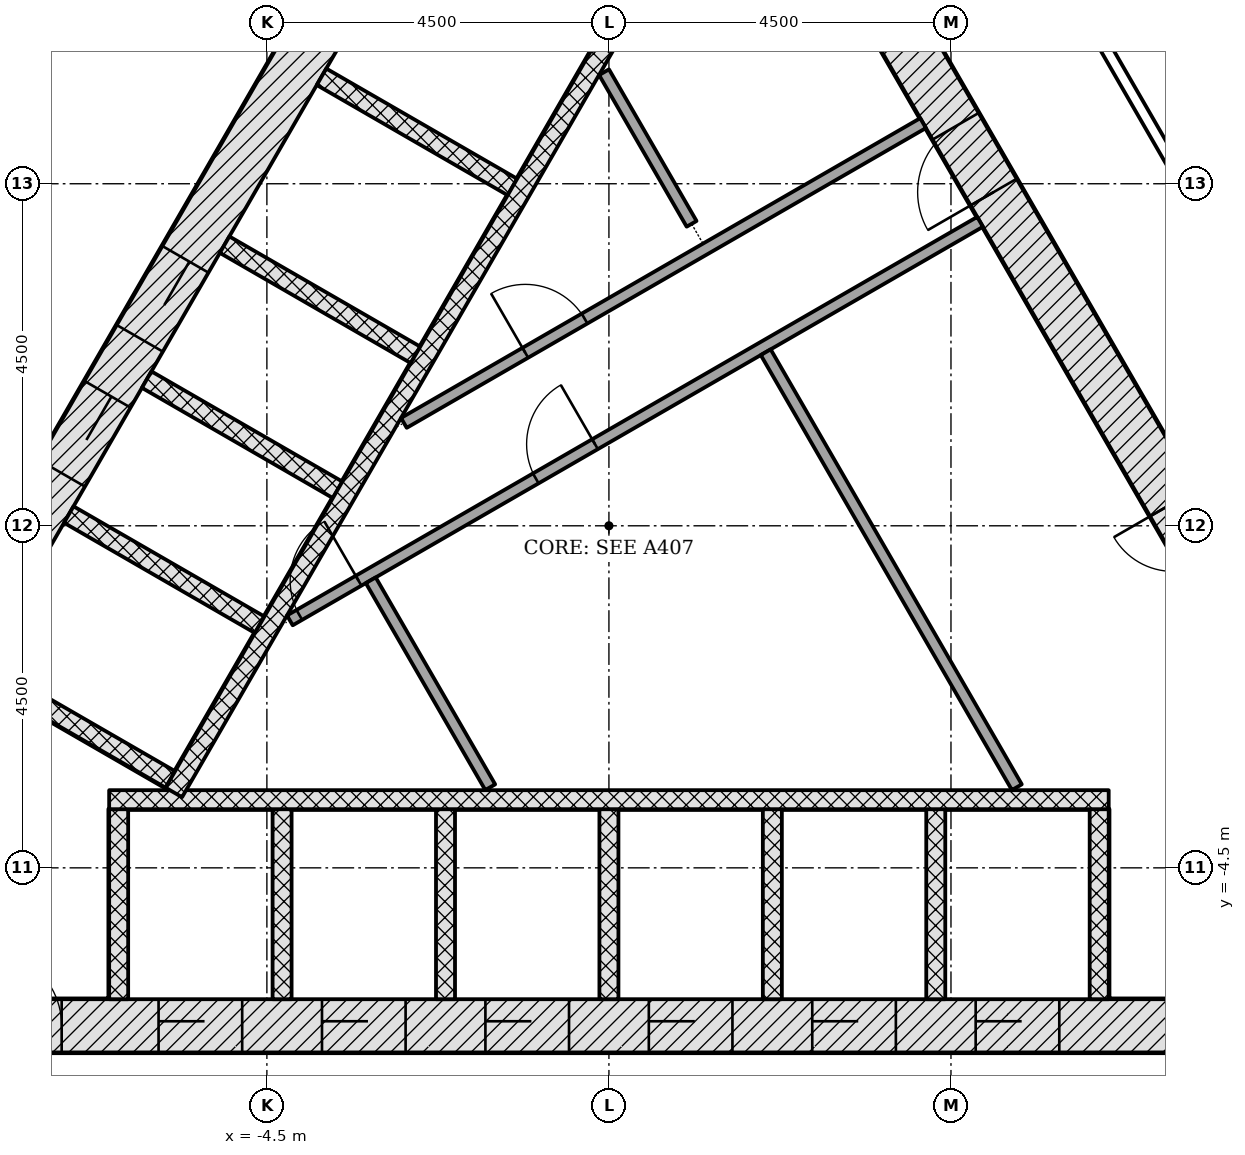
"""IFC4 building model, lengths in metres.
Left out: names, types, materials, properties, quantities, classifications, styles, units other than length and angle.
Written with IfcOpenShell. Run it as: python <this file> out.ifc"""

import sys

from ifc_helpers import new_model, si_unit, direction, frame, frame_2d, origin, place, context, subcontext, project, spatial, rectangle, extrude, element, fill, save


model = new_model("IFC4")
c1 = context("Model", 3, precision=1e-05, world=origin(), true_north=direction((0.0, 1.0)))
c2 = subcontext(c1, "Body", "Model", "MODEL_VIEW")
j1 = project(units=[si_unit("LENGTHUNIT", "METRE"), si_unit("PLANEANGLEUNIT", "RADIAN")], contexts=[c1])
p1 = place(None, origin())
s1 = spatial("IfcSite", under=j1, at=p1, CompositionType="ELEMENT")
p2 = place(p1, origin())
s2 = spatial("IfcBuilding", under=s1, at=p2, CompositionType="ELEMENT")
p3 = place(p2, frame((0.0, 0.0, 105.9)))
s3 = spatial("IfcBuildingStorey", under=s2, at=p3, CompositionType="ELEMENT", Elevation=105.9)
p4 = place(p3, frame((-9.229, -6.578, -0.2), z_axis=(0.0, 0.0, 1.0), x_axis=(1.0, 0.0, 0.0)))
e1 = element("IfcWall", 1, at=p4, inside=s3, PredefinedType="SHEAR", context=c2, shape_type="SweptSolid", body=[
    extrude(rectangle(XDim=18.458, YDim=0.7, at=frame_2d((9.229, 0.0))), origin(), (0.0, 0.0, 1.0), 3.6),
])
p5 = place(p4, frame((3.304, 0.0, 0.2)))
e2 = element("IfcOpeningElement", 2, at=p5, cuts=e1, PredefinedType="OPENING", context=c2, shape_type="SweptSolid", body=[
    extrude(rectangle(XDim=1.1, YDim=2.1, at=frame_2d((0.55, 1.05))), frame((0.0, 0.36, 0.0), z_axis=(0.0, -1.0, 0.0), x_axis=(1.0, 0.0, 0.0)), (0.0, 0.0, 1.0), 0.72),
])
p6 = place(p4, frame((5.454, 0.0, 0.2)))
e3 = element("IfcOpeningElement", 3, at=p6, cuts=e1, PredefinedType="OPENING", context=c2, shape_type="SweptSolid", body=[
    extrude(rectangle(XDim=1.1, YDim=2.1, at=frame_2d((0.55, 1.05))), frame((0.0, 0.36, 0.0), z_axis=(0.0, -1.0, 0.0), x_axis=(1.0, 0.0, 0.0)), (0.0, 0.0, 1.0), 0.72),
])
p7 = place(p4, frame((7.604, 0.0, 0.2)))
e4 = element("IfcOpeningElement", 4, at=p7, cuts=e1, PredefinedType="OPENING", context=c2, shape_type="SweptSolid", body=[
    extrude(rectangle(XDim=1.1, YDim=2.1, at=frame_2d((0.55, 1.05))), frame((0.0, 0.36, 0.0), z_axis=(0.0, -1.0, 0.0), x_axis=(1.0, 0.0, 0.0)), (0.0, 0.0, 1.0), 0.72),
])
p8 = place(p4, frame((9.754, 0.0, 0.2)))
e5 = element("IfcOpeningElement", 5, at=p8, cuts=e1, PredefinedType="OPENING", context=c2, shape_type="SweptSolid", body=[
    extrude(rectangle(XDim=1.1, YDim=2.1, at=frame_2d((0.55, 1.05))), frame((0.0, 0.36, 0.0), z_axis=(0.0, -1.0, 0.0), x_axis=(1.0, 0.0, 0.0)), (0.0, 0.0, 1.0), 0.72),
])
p9 = place(p4, frame((11.904, 0.0, 0.2)))
e6 = element("IfcOpeningElement", 6, at=p9, cuts=e1, PredefinedType="OPENING", context=c2, shape_type="SweptSolid", body=[
    extrude(rectangle(XDim=1.1, YDim=2.1, at=frame_2d((0.55, 1.05))), frame((0.0, 0.36, 0.0), z_axis=(0.0, -1.0, 0.0), x_axis=(1.0, 0.0, 0.0)), (0.0, 0.0, 1.0), 0.72),
])
p10 = place(p4, frame((14.054, 0.0, 0.2)))
e7 = element("IfcOpeningElement", 7, at=p10, cuts=e1, PredefinedType="OPENING", context=c2, shape_type="SweptSolid", body=[
    extrude(rectangle(XDim=1.1, YDim=2.1, at=frame_2d((0.55, 1.05))), frame((0.0, 0.36, 0.0), z_axis=(0.0, -1.0, 0.0), x_axis=(1.0, 0.0, 0.0)), (0.0, 0.0, 1.0), 0.72),
])
p11 = place(p4, frame((1.029, 0.0, 0.2)))
e8 = element("IfcOpeningElement", 8, at=p11, cuts=e1, PredefinedType="OPENING", context=c2, shape_type="SweptSolid", body=[
    extrude(rectangle(XDim=1.0, YDim=2.1, at=frame_2d((0.5, 1.05))), frame((0.0, 0.36, 0.0), z_axis=(0.0, -1.0, 0.0), x_axis=(1.0, 0.0, 0.0)), (0.0, 0.0, 1.0), 0.72),
])
p12 = place(p3, frame((10.311, -4.703, -0.2), z_axis=(0.0, 0.0, 1.0), x_axis=(-0.500001446645, 0.866024568562, 0.0)))
e9 = element("IfcWall", 9, at=p12, inside=s3, PredefinedType="SHEAR", context=c2, shape_type="SweptSolid", body=[
    extrude(rectangle(XDim=18.458, YDim=0.7, at=frame_2d((9.229, 0.0))), origin(), (0.0, 0.0, 1.0), 3.6),
])
p13 = place(p12, frame((10.5, 0.0, 0.2)))
e10 = element("IfcOpeningElement", 10, at=p13, cuts=e9, PredefinedType="OPENING", context=c2, shape_type="SweptSolid", body=[
    extrude(rectangle(XDim=1.0, YDim=2.1, at=frame_2d((0.5, 1.05))), frame((0.0, 0.36, 0.0), z_axis=(0.0, -1.0, 0.0), x_axis=(1.0, 0.0, 0.0)), (0.0, 0.0, 1.0), 0.72),
])
p14 = place(p12, frame((4.877, 0.0, 0.2)))
e11 = element("IfcOpeningElement", 11, at=p14, cuts=e9, PredefinedType="OPENING", context=c2, shape_type="SweptSolid", body=[
    extrude(rectangle(XDim=0.9, YDim=2.1, at=frame_2d((0.45, 1.05))), frame((0.0, 0.36, 0.0), z_axis=(0.0, -1.0, 0.0), x_axis=(1.0, 0.0, 0.0)), (0.0, 0.0, 1.0), 0.72),
])
p15 = place(p12, frame((14.452, 0.0, 0.2)))
e12 = element("IfcOpeningElement", 12, at=p15, cuts=e9, PredefinedType="OPENING", context=c2, shape_type="SweptSolid", body=[
    extrude(rectangle(XDim=0.9, YDim=2.1, at=frame_2d((0.45, 1.05))), frame((0.0, 0.36, 0.0), z_axis=(0.0, -1.0, 0.0), x_axis=(1.0, 0.0, 0.0)), (0.0, 0.0, 1.0), 0.72),
])
p16 = place(p3, frame((-1.083, 11.281, -0.2), z_axis=(0.0, 0.0, 1.0), x_axis=(-0.500001446645, -0.866024568562, 0.0)))
e13 = element("IfcWall", 13, at=p16, inside=s3, PredefinedType="SHEAR", context=c2, shape_type="SweptSolid", body=[
    extrude(rectangle(XDim=18.458, YDim=0.7, at=frame_2d((9.229, 0.0))), origin(), (0.0, 0.0, 1.0), 3.6),
])
p17 = place(p16, frame((8.979, 0.0, 0.2)))
e14 = element("IfcOpeningElement", 14, at=p17, cuts=e13, PredefinedType="OPENING", context=c2, shape_type="SweptSolid", body=[
    extrude(rectangle(XDim=1.2, YDim=2.1, at=frame_2d((0.6, 1.05))), frame((0.0, 0.36, 0.0), z_axis=(0.0, -1.0, 0.0), x_axis=(1.0, 0.0, 0.0)), (0.0, 0.0, 1.0), 0.72),
])
p18 = place(p16, frame((11.029, 0.0, 0.2)))
e15 = element("IfcOpeningElement", 15, at=p18, cuts=e13, PredefinedType="OPENING", context=c2, shape_type="SweptSolid", body=[
    extrude(rectangle(XDim=1.2, YDim=2.1, at=frame_2d((0.6, 1.05))), frame((0.0, 0.36, 0.0), z_axis=(0.0, -1.0, 0.0), x_axis=(1.0, 0.0, 0.0)), (0.0, 0.0, 1.0), 0.72),
])
for number, where, z_axis, x_axis in (
    (16, (-6.45, -6.228, -0.2), (0.0, 0.0, 1.0), (0.0, 1.0, 0.0)),
    (17, (-4.3, -6.228, -0.2), (0.0, 0.0, 1.0), (0.0, 1.0, 0.0)),
    (18, (-2.15, -6.228, -0.2), (0.0, 0.0, 1.0), (0.0, 1.0, 0.0)),
    (19, (0.0, -6.228, -0.2), (0.0, 0.0, 1.0), (0.0, 1.0, 0.0)),
    (20, (2.15, -6.228, -0.2), (0.0, 0.0, 1.0), (0.0, 1.0, 0.0)),
    (21, (4.3, -6.228, -0.2), (0.0, 0.0, 1.0), (0.0, 1.0, 0.0)),
    (22, (6.45, -6.228, -0.2), (0.0, 0.0, 1.0), (0.0, 1.0, 0.0)),
):
    element("IfcWall", number, at=place(p3, frame(where, z_axis=z_axis, x_axis=x_axis)), inside=s3, PredefinedType="PARTITIONING", context=c2, shape_type="SweptSolid", body=[
        extrude(rectangle(XDim=2.5, YDim=0.25, at=frame_2d((1.25, 0.0))), origin(), (0.0, 0.0, 1.0), 3.6),
    ])
p19 = place(p3, frame((-6.575, -3.603, 0.0), z_axis=(0.0, 0.0, 1.0), x_axis=(1.0, 0.0, 0.0)))
e23 = element("IfcWall", 23, at=p19, inside=s3, PredefinedType="PARTITIONING", context=c2, shape_type="SweptSolid", body=[
    extrude(rectangle(XDim=13.15, YDim=0.25, at=frame_2d((6.575, 0.0))), origin(), (0.0, 0.0, 1.0), 3.4),
])
for number, where, z_axis, x_axis in (
    (24, (-3.781, 5.907, -0.2), (0.0, 0.0, 1.0), (0.866, -0.5, 0.0)),
    (25, (-5.056, 3.699, -0.2), (0.0, 0.0, 1.0), (0.866, -0.5, 0.0)),
    (26, (-6.081, 1.923, -0.2), (0.0, 0.0, 1.0), (0.866, -0.5, 0.0)),
    (27, (-7.106, 0.148, -0.2), (0.0, 0.0, 1.0), (0.866, -0.5, 0.0)),
    (28, (-8.281, -1.887, -0.2), (0.0, 0.0, 1.0), (0.866, -0.5, 0.0)),
):
    element("IfcWall", number, at=place(p3, frame(where, z_axis=z_axis, x_axis=x_axis)), inside=s3, PredefinedType="PARTITIONING", context=c2, shape_type="SweptSolid", body=[
        extrude(rectangle(XDim=2.9, YDim=0.25, at=frame_2d((1.45, 0.0))), origin(), (0.0, 0.0, 1.0), 3.6),
    ])
p20 = place(p3, frame((0.176, 6.711, 0.0), z_axis=(0.0, 0.0, 1.0), x_axis=(-0.500004227369, -0.866022963098, 0.0)))
e29 = element("IfcWall", 29, at=p20, inside=s3, PredefinedType="PARTITIONING", context=c2, shape_type="SweptSolid", body=[
    extrude(rectangle(XDim=11.8, YDim=0.25, at=frame_2d((5.9, 0.0))), origin(), (0.0, 0.0, 1.0), 3.4),
])
p21 = place(p3, frame((-4.198, -1.244, 0.0), z_axis=(0.0, 0.0, 1.0), x_axis=(0.866020798945, 0.500007975732, 0.0)))
e30 = element("IfcWall", 30, at=p21, inside=s3, PredefinedType="PARTITIONING", context=c2, shape_type="SweptSolid", body=[
    extrude(rectangle(XDim=10.486, YDim=0.15, at=frame_2d((5.243, 0.0))), origin(), (0.0, 0.0, 1.0), 3.4),
])
p22 = place(p21, frame((3.736, 0.0, 0.0)))
e31 = element("IfcOpeningElement", 31, at=p22, cuts=e30, PredefinedType="OPENING", context=c2, shape_type="SweptSolid", body=[
    extrude(rectangle(XDim=0.9, YDim=2.1, at=frame_2d((0.45, 1.05))), frame((0.0, 0.085, 0.0), z_axis=(0.0, -1.0, 0.0), x_axis=(1.0, 0.0, 0.0)), (0.0, 0.0, 1.0), 0.17),
])
p23 = place(p21, frame((0.144, 0.0, 0.0)))
e32 = element("IfcOpeningElement", 32, at=p23, cuts=e30, PredefinedType="OPENING", context=c2, shape_type="SweptSolid", body=[
    extrude(rectangle(XDim=0.9, YDim=2.1, at=frame_2d((0.45, 1.05))), frame((0.0, 0.085, 0.0), z_axis=(0.0, -1.0, 0.0), x_axis=(1.0, 0.0, 0.0)), (0.0, 0.0, 1.0), 0.17),
])
p24 = place(p3, frame((5.367, -3.439, 0.0), z_axis=(0.0, 0.0, 1.0), x_axis=(-0.499981499682, 0.866036084685, 0.0)))
e33 = element("IfcWall", 33, at=p24, inside=s3, PredefinedType="PARTITIONING", context=c2, shape_type="SweptSolid", body=[
    extrude(rectangle(XDim=6.608, YDim=0.15, at=frame_2d((3.304, 0.0))), origin(), (0.0, 0.0, 1.0), 3.4),
])
p25 = place(p3, frame((-1.561, -3.439, 0.0), z_axis=(0.0, 0.0, 1.0), x_axis=(-0.499989077369, 0.866031709877, 0.0)))
e34 = element("IfcWall", 34, at=p25, inside=s3, PredefinedType="PARTITIONING", context=c2, shape_type="SweptSolid", body=[
    extrude(rectangle(XDim=3.144, YDim=0.15, at=frame_2d((1.572, 0.0))), origin(), (0.0, 0.0, 1.0), 3.4),
])
p26 = place(p3, frame((-2.698, 1.354, 0.0), z_axis=(0.0, 0.0, 1.0), x_axis=(0.866021157486, 0.500007354732, 0.0)))
e35 = element("IfcWall", 35, at=p26, inside=s3, PredefinedType="PARTITIONING", context=c2, shape_type="SweptSolid", body=[
    extrude(rectangle(XDim=7.888, YDim=0.15, at=frame_2d((3.944, 0.0))), origin(), (0.0, 0.0, 1.0), 3.4),
])
p27 = place(p26, frame((1.845, 0.0, 0.0)))
e36 = element("IfcOpeningElement", 36, at=p27, cuts=e35, PredefinedType="OPENING", context=c2, shape_type="SweptSolid", body=[
    extrude(rectangle(XDim=0.9, YDim=2.1, at=frame_2d((0.45, 1.05))), frame((0.0, 0.085, 0.0), z_axis=(0.0, -1.0, 0.0), x_axis=(1.0, 0.0, 0.0)), (0.0, 0.0, 1.0), 0.17),
])
p28 = place(p3, frame((1.088, 3.972, 0.0), z_axis=(0.0, 0.0, 1.0), x_axis=(-0.500116913307, 0.865957893332, 0.0)))
e37 = element("IfcWall", 37, at=p28, inside=s3, PredefinedType="PARTITIONING", context=c2, shape_type="SweptSolid", body=[
    extrude(rectangle(XDim=2.304, YDim=0.15, at=frame_2d((1.152, 0.0))), origin(), (0.0, 0.0, 1.0), 3.4),
])
p29 = place(p3, frame((-16.169, -3.099, 0.0), z_axis=(0.0, 0.0, 1.0), x_axis=(0.499999805269, 0.866025516212, 0.0)))
e38 = element("IfcWall", 38, at=p29, inside=s3, PredefinedType="PARTITIONING", context=c2, shape_type="SweptSolid", body=[
    extrude(rectangle(XDim=22.097, YDim=0.15, at=frame_2d((11.049, 0.0))), origin(), (0.0, 0.0, 1.0), 2.847),
])
p30 = place(p29, frame((17.776, 0.0, 0.0)))
e39 = element("IfcOpeningElement", 39, at=p30, cuts=e38, PredefinedType="OPENING", context=c2, shape_type="SweptSolid", body=[
    extrude(rectangle(XDim=1.0, YDim=2.1, at=frame_2d((0.5, 1.05))), frame((0.0, 0.085, 0.0), z_axis=(0.0, -1.0, 0.0), x_axis=(1.0, 0.0, 0.0)), (0.0, 0.0, 1.0), 0.17),
])
p31 = place(p29, frame((15.186, 0.0, 0.0)))
e40 = element("IfcOpeningElement", 40, at=p31, cuts=e38, PredefinedType="OPENING", context=c2, shape_type="SweptSolid", body=[
    extrude(rectangle(XDim=1.0, YDim=2.1, at=frame_2d((0.5, 1.05))), frame((0.0, 0.085, 0.0), z_axis=(0.0, -1.0, 0.0), x_axis=(1.0, 0.0, 0.0)), (0.0, 0.0, 1.0), 0.17),
])
p32 = place(p29, frame((11.84, 0.0, 0.0)))
e41 = element("IfcOpeningElement", 41, at=p32, cuts=e38, PredefinedType="OPENING", context=c2, shape_type="SweptSolid", body=[
    extrude(rectangle(XDim=1.5, YDim=2.1, at=frame_2d((0.75, 1.05))), frame((0.0, 0.085, 0.0), z_axis=(0.0, -1.0, 0.0), x_axis=(1.0, 0.0, 0.0)), (0.0, 0.0, 1.0), 0.17),
])
p33 = place(p29, frame((4.503, 0.0, 0.0)))
e42 = element("IfcOpeningElement", 42, at=p33, cuts=e38, PredefinedType="OPENING", context=c2, shape_type="SweptSolid", body=[
    extrude(rectangle(XDim=1.5, YDim=2.1, at=frame_2d((0.75, 1.05))), frame((0.0, 0.085, 0.0), z_axis=(0.0, -1.0, 0.0), x_axis=(1.0, 0.0, 0.0)), (0.0, 0.0, 1.0), 0.17),
])
p34 = place(p3, frame((-4.407, 13.374, 0.0), z_axis=(0.0, 0.0, 1.0), x_axis=(-0.499997181693, -0.866027030928, 0.0)))
e43 = element("IfcWall", 43, at=p34, inside=s3, PredefinedType="PARTITIONING", context=c2, shape_type="SweptSolid", body=[
    extrude(rectangle(XDim=16.77, YDim=0.15, at=frame_2d((8.385, 0.0))), origin(), (0.0, 0.0, 1.0), 2.847),
])
p35 = place(p34, frame((8.879, 0.0, 0.0)))
e44 = element("IfcOpeningElement", 44, at=p35, cuts=e43, PredefinedType="OPENING", context=c2, shape_type="SweptSolid", body=[
    extrude(rectangle(XDim=1.0, YDim=2.1, at=frame_2d((0.5, 1.05))), frame((0.0, 0.085, 0.0), z_axis=(0.0, -1.0, 0.0), x_axis=(1.0, 0.0, 0.0)), (0.0, 0.0, 1.0), 0.17),
])
p36 = place(p3, frame((5.289, 8.446, 0.0), z_axis=(0.0, 0.0, 1.0), x_axis=(0.499996620721, -0.866027354803, 0.0)))
e45 = element("IfcWall", 45, at=p36, inside=s3, PredefinedType="PARTITIONING", context=c2, shape_type="SweptSolid", body=[
    extrude(rectangle(XDim=15.057, YDim=0.15, at=frame_2d((7.528, 0.0))), origin(), (0.0, 0.0, 1.0), 2.847),
])
p37 = place(p36, frame((10.689, 0.0, 0.0)))
e46 = element("IfcOpeningElement", 46, at=p37, cuts=e45, PredefinedType="OPENING", context=c2, shape_type="SweptSolid", body=[
    extrude(rectangle(XDim=1.0, YDim=2.1, at=frame_2d((0.5, 1.05))), frame((0.0, 0.085, 0.0), z_axis=(0.0, -1.0, 0.0), x_axis=(1.0, 0.0, 0.0)), (0.0, 0.0, 1.0), 0.17),
])
p38 = place(p36, frame((4.695, 0.0, 0.0)))
e47 = element("IfcOpeningElement", 47, at=p38, cuts=e45, PredefinedType="OPENING", context=c2, shape_type="SweptSolid", body=[
    extrude(rectangle(XDim=1.0, YDim=2.1, at=frame_2d((0.5, 1.05))), frame((0.0, 0.085, 0.0), z_axis=(0.0, -1.0, 0.0), x_axis=(1.0, 0.0, 0.0)), (0.0, 0.0, 1.0), 0.17),
])
p39 = place(p5, origin())
e48 = element("IfcDoor", 48, at=p39, inside=s3, OperationType="DOUBLE_DOOR_SLIDING", PredefinedType="DOOR", context=c2, shape_type="SweptSolid", body=[
    extrude(rectangle(XDim=1.1, YDim=2.1, at=frame_2d((0.55, 1.05))), frame((0.0, 0.025, 0.0), z_axis=(0.0, -1.0, 0.0), x_axis=(1.0, 0.0, 0.0)), (0.0, 0.0, 1.0), 0.05),
])
fill(e2, e48)
p40 = place(p6, origin())
e49 = element("IfcDoor", 49, at=p40, inside=s3, OperationType="DOUBLE_DOOR_SLIDING", PredefinedType="DOOR", context=c2, shape_type="SweptSolid", body=[
    extrude(rectangle(XDim=1.1, YDim=2.1, at=frame_2d((0.55, 1.05))), frame((0.0, 0.025, 0.0), z_axis=(0.0, -1.0, 0.0), x_axis=(1.0, 0.0, 0.0)), (0.0, 0.0, 1.0), 0.05),
])
fill(e3, e49)
p41 = place(p7, origin())
e50 = element("IfcDoor", 50, at=p41, inside=s3, OperationType="DOUBLE_DOOR_SLIDING", PredefinedType="DOOR", context=c2, shape_type="SweptSolid", body=[
    extrude(rectangle(XDim=1.1, YDim=2.1, at=frame_2d((0.55, 1.05))), frame((0.0, 0.025, 0.0), z_axis=(0.0, -1.0, 0.0), x_axis=(1.0, 0.0, 0.0)), (0.0, 0.0, 1.0), 0.05),
])
fill(e4, e50)
p42 = place(p8, origin())
e51 = element("IfcDoor", 51, at=p42, inside=s3, OperationType="DOUBLE_DOOR_SLIDING", PredefinedType="DOOR", context=c2, shape_type="SweptSolid", body=[
    extrude(rectangle(XDim=1.1, YDim=2.1, at=frame_2d((0.55, 1.05))), frame((0.0, 0.025, 0.0), z_axis=(0.0, -1.0, 0.0), x_axis=(1.0, 0.0, 0.0)), (0.0, 0.0, 1.0), 0.05),
])
fill(e5, e51)
p43 = place(p9, origin())
e52 = element("IfcDoor", 52, at=p43, inside=s3, OperationType="DOUBLE_DOOR_SLIDING", PredefinedType="DOOR", context=c2, shape_type="SweptSolid", body=[
    extrude(rectangle(XDim=1.1, YDim=2.1, at=frame_2d((0.55, 1.05))), frame((0.0, 0.025, 0.0), z_axis=(0.0, -1.0, 0.0), x_axis=(1.0, 0.0, 0.0)), (0.0, 0.0, 1.0), 0.05),
])
fill(e6, e52)
p44 = place(p10, origin())
e53 = element("IfcDoor", 53, at=p44, inside=s3, OperationType="DOUBLE_DOOR_SLIDING", PredefinedType="DOOR", context=c2, shape_type="SweptSolid", body=[
    extrude(rectangle(XDim=1.1, YDim=2.1, at=frame_2d((0.55, 1.05))), frame((0.0, 0.025, 0.0), z_axis=(0.0, -1.0, 0.0), x_axis=(1.0, 0.0, 0.0)), (0.0, 0.0, 1.0), 0.05),
])
fill(e7, e53)
p45 = place(p17, origin())
e54 = element("IfcDoor", 54, at=p45, inside=s3, OperationType="DOUBLE_DOOR_SLIDING", PredefinedType="DOOR", context=c2, shape_type="SweptSolid", body=[
    extrude(rectangle(XDim=1.2, YDim=2.1, at=frame_2d((0.6, 1.05))), frame((0.0, 0.025, 0.0), z_axis=(0.0, -1.0, 0.0), x_axis=(1.0, 0.0, 0.0)), (0.0, 0.0, 1.0), 0.05),
])
fill(e14, e54)
p46 = place(p18, origin())
e55 = element("IfcDoor", 55, at=p46, inside=s3, OperationType="DOUBLE_DOOR_SLIDING", PredefinedType="DOOR", context=c2, shape_type="SweptSolid", body=[
    extrude(rectangle(XDim=1.2, YDim=2.1, at=frame_2d((0.6, 1.05))), frame((0.0, 0.025, 0.0), z_axis=(0.0, -1.0, 0.0), x_axis=(1.0, 0.0, 0.0)), (0.0, 0.0, 1.0), 0.05),
])
fill(e15, e55)
p47 = place(p13, origin())
e56 = element("IfcDoor", 56, at=p47, inside=s3, OperationType="SINGLE_SWING_LEFT", PredefinedType="DOOR", context=c2, shape_type="SweptSolid", body=[
    extrude(rectangle(XDim=1.0, YDim=2.1, at=frame_2d((0.5, 1.05))), frame((0.0, 0.075, 0.0), z_axis=(0.0, -1.0, 0.0), x_axis=(1.0, 0.0, 0.0)), (0.0, 0.0, 1.0), 0.15),
])
fill(e10, e56)
p48 = place(p22, origin())
e57 = element("IfcDoor", 57, at=p48, inside=s3, OperationType="SINGLE_SWING_RIGHT", PredefinedType="DOOR", context=c2, shape_type="SweptSolid", body=[
    extrude(rectangle(XDim=0.9, YDim=2.1, at=frame_2d((0.45, 1.05))), frame((0.0, 0.025, 0.0), z_axis=(0.0, -1.0, 0.0), x_axis=(1.0, 0.0, 0.0)), (0.0, 0.0, 1.0), 0.05),
])
fill(e31, e57)
p49 = place(p27, origin())
e58 = element("IfcDoor", 58, at=p49, inside=s3, OperationType="SINGLE_SWING_LEFT", PredefinedType="DOOR", context=c2, shape_type="SweptSolid", body=[
    extrude(rectangle(XDim=0.9, YDim=2.1, at=frame_2d((0.45, 1.05))), frame((0.0, 0.025, 0.0), z_axis=(0.0, -1.0, 0.0), x_axis=(1.0, 0.0, 0.0)), (0.0, 0.0, 1.0), 0.05),
])
fill(e36, e58)
p50 = place(p23, origin())
e59 = element("IfcDoor", 59, at=p50, inside=s3, OperationType="SINGLE_SWING_RIGHT", PredefinedType="DOOR", context=c2, shape_type="SweptSolid", body=[
    extrude(rectangle(XDim=0.9, YDim=2.1, at=frame_2d((0.45, 1.05))), frame((0.0, 0.025, 0.0), z_axis=(0.0, -1.0, 0.0), x_axis=(1.0, 0.0, 0.0)), (0.0, 0.0, 1.0), 0.05),
])
fill(e32, e59)
p51 = place(p11, origin())
e60 = element("IfcDoor", 60, at=p51, inside=s3, OperationType="SINGLE_SWING_LEFT", PredefinedType="DOOR", context=c2, shape_type="SweptSolid", body=[
    extrude(rectangle(XDim=1.0, YDim=2.1, at=frame_2d((0.5, 1.05))), frame((0.0, 0.075, 0.0), z_axis=(0.0, -1.0, 0.0), x_axis=(1.0, 0.0, 0.0)), (0.0, 0.0, 1.0), 0.15),
])
fill(e8, e60)
save(model, sys.argv[1])
